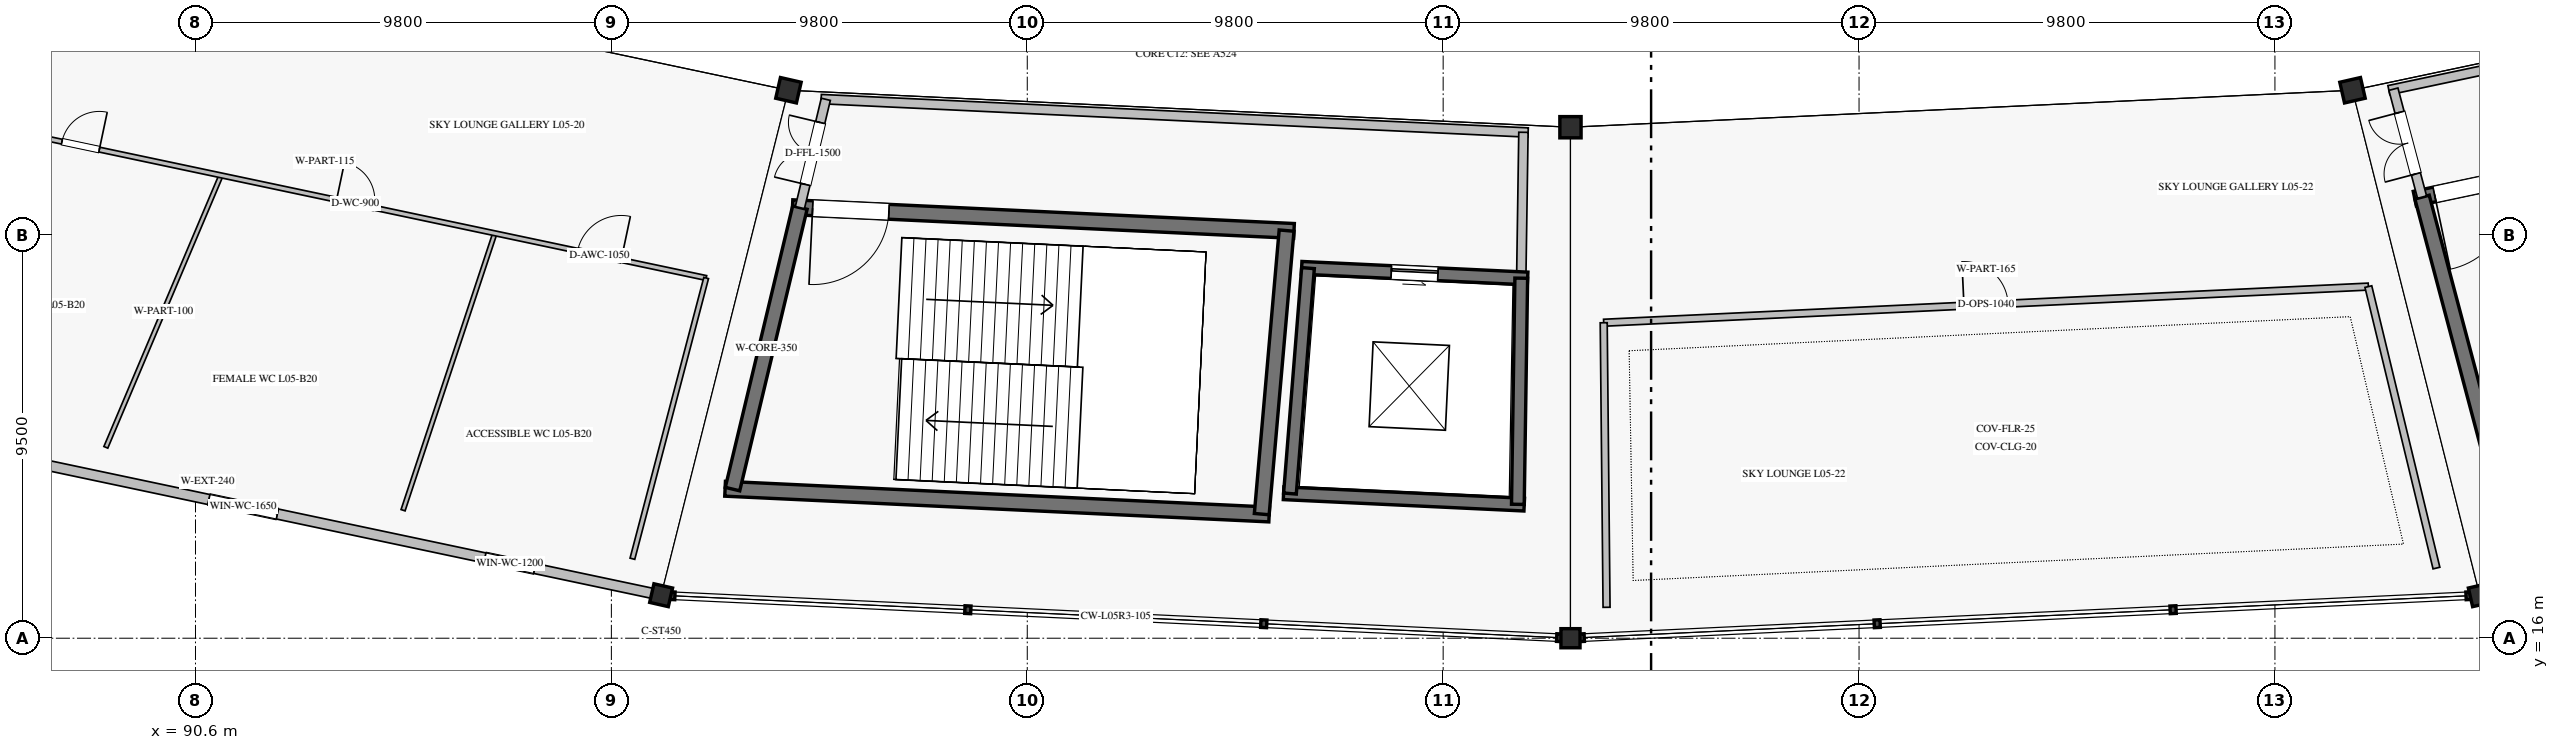
"""IFC4 building model, lengths in metres.
Left out: names, types, materials, properties, quantities, classifications, styles, units other than length and angle.
Written with IfcOpenShell. Run it as: python <this file> out.ifc"""

import sys

from ifc_helpers import new_model, si_unit, direction, frame, frame_2d, origin, origin_2d, place, context, subcontext, project, spatial, rectangle, hollow_rectangle, extrude, element, fill, save


model = new_model("IFC4")
c1 = context("Model", 3, precision=1e-05, world=origin(), true_north=direction((0.0, 1.0)))
c2 = subcontext(c1, "Body", "Model", "MODEL_VIEW")
j1 = project(units=[si_unit("LENGTHUNIT", "METRE"), si_unit("PLANEANGLEUNIT", "RADIAN")], contexts=[c1])
p1 = place(None, origin())
s1 = spatial("IfcSite", under=j1, at=p1, CompositionType="ELEMENT")
p2 = place(p1, origin())
s2 = spatial("IfcBuilding", under=s1, at=p2, CompositionType="ELEMENT")
p3 = place(p2, frame((0.0, 0.0, 25.84)))
s3 = spatial("IfcBuildingStorey", under=s2, at=p3, CompositionType="ELEMENT", Elevation=25.84)
for number, where, z_axis, x_axis in (
    (1, (104.572, 28.911, 0.0), (0.0, 0.0, 1.0), (-0.223, -0.975, 0.0)),
    (2, (123.0, 28.04, 0.0), (0.0, 0.0, 1.0), (0.0, -1.0, 0.0)),
    (3, (141.428, 28.911, 0.0), (0.0, 0.0, 1.0), (0.223, -0.975, 0.0)),
):
    element("IfcColumn", number, at=place(p3, frame(where, z_axis=z_axis, x_axis=x_axis)), inside=s3, PredefinedType="COLUMN", context=c2, shape_type="SweptSolid", body=[
        extrude(hollow_rectangle(XDim=0.5, YDim=0.5, WallThickness=0.022, at=origin_2d()), origin(), (0.0, 0.0, 1.0), 5.44),
    ])
for number, where, z_axis, x_axis in (
    (4, (101.572, 17.013, 0.0), (0.0, 0.0, 1.0), (-0.223, -0.975, 0.0)),
    (5, (123.0, 16.0, 0.0), (0.0, 0.0, 1.0), (0.0, -1.0, 0.0)),
    (6, (144.428, 17.013, 0.0), (0.0, 0.0, 1.0), (0.223, -0.975, 0.0)),
):
    element("IfcColumn", number, at=place(p3, frame(where, z_axis=z_axis, x_axis=x_axis)), inside=s3, PredefinedType="COLUMN", context=c2, shape_type="SweptSolid", body=[
        extrude(hollow_rectangle(XDim=0.45, YDim=0.45, WallThickness=0.022, at=origin_2d()), origin(), (0.0, 0.0, 1.0), 5.44),
    ])
p4 = place(p3, frame((80.41, 21.49, 0.0), z_axis=(0.0, 0.0, 1.0), x_axis=(0.978344108288, -0.206985037572, 0.0)))
e7 = element("IfcWall", 7, at=p4, inside=s3, PredefinedType="SOLIDWALL", context=c2, shape_type="SweptSolid", body=[
    extrude(rectangle(XDim=21.41, YDim=0.24, at=frame_2d((10.705, 0.0))), origin(), (0.0, 0.0, 1.0), 4.53),
])
p5 = place(p4, frame((3.557, 0.0, 1.65)))
e8 = element("IfcOpeningElement", 8, at=p5, cuts=e7, PredefinedType="OPENING", context=c2, shape_type="SweptSolid", body=[
    extrude(rectangle(XDim=1.45, YDim=0.95, at=frame_2d((0.725, 0.475))), frame((0.0, 0.13, 0.0), z_axis=(0.0, -1.0, 0.0), x_axis=(1.0, 0.0, 0.0)), (0.0, 0.0, 1.0), 0.26),
])
p6 = place(p4, frame((10.737, 0.0, 1.65)))
e9 = element("IfcOpeningElement", 9, at=p6, cuts=e7, PredefinedType="OPENING", context=c2, shape_type="SweptSolid", body=[
    extrude(rectangle(XDim=1.65, YDim=1.0, at=frame_2d((0.825, 0.5))), frame((0.0, 0.13, 0.0), z_axis=(0.0, -1.0, 0.0), x_axis=(1.0, 0.0, 0.0)), (0.0, 0.0, 1.0), 0.26),
])
p7 = place(p4, frame((17.385, 0.0, 1.65)))
e10 = element("IfcOpeningElement", 10, at=p7, cuts=e7, PredefinedType="OPENING", context=c2, shape_type="SweptSolid", body=[
    extrude(rectangle(XDim=1.2, YDim=0.9, at=frame_2d((0.6, 0.45))), frame((0.0, 0.13, 0.0), z_axis=(0.0, -1.0, 0.0), x_axis=(1.0, 0.0, 0.0)), (0.0, 0.0, 1.0), 0.26),
])
p8 = place(p3, frame((104.667, 26.155, 0.0), z_axis=(0.0, 0.0, 1.0), x_axis=(0.998883770468, -0.04723571843, 0.0)))
e11 = element("IfcWall", 11, at=p8, inside=s3, PredefinedType="SHEAR", context=c2, shape_type="SweptSolid", body=[
    extrude(rectangle(XDim=11.831, YDim=0.35, at=frame_2d((5.916, 0.0))), origin(), (0.0, 0.0, 1.0), 5.18),
])
p9 = place(p8, frame((0.475, 0.0, 0.0)))
e12 = element("IfcOpeningElement", 12, at=p9, cuts=e11, PredefinedType="OPENING", context=c2, shape_type="SweptSolid", body=[
    extrude(rectangle(XDim=1.8, YDim=2.2, at=frame_2d((0.9, 1.1))), frame((0.0, 0.185, 0.0), z_axis=(0.0, -1.0, 0.0), x_axis=(1.0, 0.0, 0.0)), (0.0, 0.0, 1.0), 0.37),
])
p10 = place(p3, frame((103.08, 19.522, 0.0), z_axis=(0.0, 0.0, 1.0), x_axis=(0.998884004857, -0.047230761603, 0.0)))
e13 = element("IfcWall", 13, at=p10, inside=s3, PredefinedType="SHEAR", context=c2, shape_type="SweptSolid", body=[
    extrude(rectangle(XDim=12.835, YDim=0.35, at=frame_2d((6.417, 0.0))), origin(), (0.0, 0.0, 1.0), 5.18),
])
p11 = place(p3, frame((104.842, 26.146, 0.0), z_axis=(0.0, 0.0, 1.0), x_axis=(-0.232820532896, -0.972519716747, 0.0)))
e14 = element("IfcWall", 14, at=p11, inside=s3, PredefinedType="SHEAR", context=c2, shape_type="SweptSolid", body=[
    extrude(rectangle(XDim=6.82, YDim=0.35, at=frame_2d((3.41, 0.0))), origin(), (0.0, 0.0, 1.0), 5.18),
])
p12 = place(p3, frame((116.31, 25.604, 0.0), z_axis=(0.0, 0.0, 1.0), x_axis=(-0.087232889326, -0.996187945631, 0.0)))
e15 = element("IfcWall", 15, at=p12, inside=s3, PredefinedType="SHEAR", context=c2, shape_type="SweptSolid", body=[
    extrude(rectangle(XDim=6.706, YDim=0.35, at=frame_2d((3.353, 0.0))), origin(), (0.0, 0.0, 1.0), 5.18),
])
p13 = place(p3, frame((116.665, 24.728, 0.0), z_axis=(0.0, 0.0, 1.0), x_axis=(0.998882494219, -0.047262699282, 0.0)))
e16 = element("IfcWall", 16, at=p13, inside=s3, PredefinedType="SHEAR", context=c2, shape_type="SweptSolid", body=[
    extrude(rectangle(XDim=5.331, YDim=0.3, at=frame_2d((2.666, 0.0))), origin(), (0.0, 0.0, 1.0), 5.18),
])
p14 = place(p13, frame((2.115, 0.0, 0.0)))
e17 = element("IfcOpeningElement", 17, at=p14, cuts=e16, PredefinedType="OPENING", context=c2, shape_type="SweptSolid", body=[
    extrude(rectangle(XDim=1.1, YDim=2.2, at=frame_2d((0.55, 1.1))), frame((0.0, 0.16, 0.0), z_axis=(0.0, -1.0, 0.0), x_axis=(1.0, 0.0, 0.0)), (0.0, 0.0, 1.0), 0.32),
])
p15 = place(p3, frame((116.24, 19.416, 0.0), z_axis=(0.0, 0.0, 1.0), x_axis=(0.998884329444, -0.047223896393, 0.0)))
e18 = element("IfcWall", 18, at=p15, inside=s3, PredefinedType="SHEAR", context=c2, shape_type="SweptSolid", body=[
    extrude(rectangle(XDim=5.677, YDim=0.3, at=frame_2d((2.838, 0.0))), origin(), (0.0, 0.0, 1.0), 5.18),
])
p16 = place(p3, frame((116.815, 24.72, 0.0), z_axis=(0.0, 0.0, 1.0), x_axis=(-0.079807132276, -0.996810323802, 0.0)))
e19 = element("IfcWall", 19, at=p16, inside=s3, PredefinedType="SHEAR", context=c2, shape_type="SweptSolid", body=[
    extrude(rectangle(XDim=5.329, YDim=0.3, at=frame_2d((2.665, 0.0))), origin(), (0.0, 0.0, 1.0), 5.18),
])
p17 = place(p3, frame((121.84, 24.483, 0.0), z_axis=(0.0, 0.0, 1.0), x_axis=(-0.014935332807, -0.999888461697, 0.0)))
e20 = element("IfcWall", 20, at=p17, inside=s3, PredefinedType="SHEAR", context=c2, shape_type="SweptSolid", body=[
    extrude(rectangle(XDim=5.329, YDim=0.3, at=frame_2d((2.665, 0.0))), origin(), (0.0, 0.0, 1.0), 5.18),
])
p18 = place(p3, frame((105.343, 28.703, 0.0), z_axis=(0.0, 0.0, 1.0), x_axis=(0.998884242682, -0.047225731555, 0.0)))
e21 = element("IfcWall", 21, at=p18, inside=s3, PredefinedType="SOLIDWALL", context=c2, shape_type="SweptSolid", body=[
    extrude(rectangle(XDim=16.677, YDim=0.22, at=frame_2d((8.339, 0.0))), origin(), (0.0, 0.0, 1.0), 5.18),
])
p19 = place(p3, frame((105.453, 28.698, 0.0), z_axis=(0.0, 0.0, 1.0), x_axis=(-0.232756927197, -0.972534941707, 0.0)))
e22 = element("IfcWall", 22, at=p19, inside=s3, PredefinedType="SOLIDWALL", context=c2, shape_type="SweptSolid", body=[
    extrude(rectangle(XDim=2.623, YDim=0.22, at=frame_2d((1.312, 0.0))), origin(), (0.0, 0.0, 1.0), 5.18),
])
p20 = place(p19, frame((0.562, 0.0, 0.0)))
e23 = element("IfcOpeningElement", 23, at=p20, cuts=e22, PredefinedType="OPENING", context=c2, shape_type="SweptSolid", body=[
    extrude(rectangle(XDim=1.5, YDim=2.2, at=frame_2d((0.75, 1.1))), frame((0.0, 0.12, 0.0), z_axis=(0.0, -1.0, 0.0), x_axis=(1.0, 0.0, 0.0)), (0.0, 0.0, 1.0), 0.24),
])
p21 = place(p3, frame((121.892, 27.92, 0.0), z_axis=(0.0, 0.0, 1.0), x_axis=(-0.014984113027, -0.999887731876, 0.0)))
e24 = element("IfcWall", 24, at=p21, inside=s3, PredefinedType="SOLIDWALL", context=c2, shape_type="SweptSolid", body=[
    extrude(rectangle(XDim=3.438, YDim=0.22, at=frame_2d((1.719, 0.0))), origin(), (0.0, 0.0, 1.0), 5.18),
])
p22 = place(p3, frame((142.896, 26.357, 0.0), z_axis=(0.0, 0.0, 1.0), x_axis=(0.978345203961, 0.206979858648, 0.0)))
e25 = element("IfcWall", 25, at=p22, inside=s3, PredefinedType="SHEAR", context=c2, shape_type="SweptSolid", body=[
    extrude(rectangle(XDim=12.044, YDim=0.35, at=frame_2d((6.022, 0.0))), origin(), (0.0, 0.0, 1.0), 5.18),
])
p23 = place(p22, frame((0.475, 0.0, 0.0)))
e26 = element("IfcOpeningElement", 26, at=p23, cuts=e25, PredefinedType="OPENING", context=c2, shape_type="SweptSolid", body=[
    extrude(rectangle(XDim=1.8, YDim=2.2, at=frame_2d((0.9, 1.1))), frame((0.0, 0.185, 0.0), z_axis=(0.0, -1.0, 0.0), x_axis=(1.0, 0.0, 0.0)), (0.0, 0.0, 1.0), 0.37),
])
p24 = place(p3, frame((143.067, 26.394, 0.0), z_axis=(0.0, 0.0, 1.0), x_axis=(0.256518400663, -0.966539347425, 0.0)))
e27 = element("IfcWall", 27, at=p24, inside=s3, PredefinedType="SHEAR", context=c2, shape_type="SweptSolid", body=[
    extrude(rectangle(XDim=6.84, YDim=0.35, at=frame_2d((3.42, 0.0))), origin(), (0.0, 0.0, 1.0), 5.18),
])
p25 = place(p3, frame((142.284, 28.914, 0.0), z_axis=(0.0, 0.0, 1.0), x_axis=(0.97834522483, 0.206979760008, 0.0)))
e28 = element("IfcWall", 28, at=p25, inside=s3, PredefinedType="SOLIDWALL", context=c2, shape_type="SweptSolid", body=[
    extrude(rectangle(XDim=16.983, YDim=0.22, at=frame_2d((8.491, 0.0))), origin(), (0.0, 0.0, 1.0), 5.18),
])
p26 = place(p3, frame((142.392, 28.936, 0.0), z_axis=(0.0, 0.0, 1.0), x_axis=(0.256507243456, -0.966542308466, 0.0)))
e29 = element("IfcWall", 29, at=p26, inside=s3, PredefinedType="SOLIDWALL", context=c2, shape_type="SweptSolid", body=[
    extrude(rectangle(XDim=2.631, YDim=0.22, at=frame_2d((1.315, 0.0))), origin(), (0.0, 0.0, 1.0), 5.18),
])
p27 = place(p26, frame((0.565, 0.0, 0.0)))
e30 = element("IfcOpeningElement", 30, at=p27, cuts=e29, PredefinedType="OPENING", context=c2, shape_type="SweptSolid", body=[
    extrude(rectangle(XDim=1.5, YDim=2.2, at=frame_2d((0.75, 1.1))), frame((0.0, 0.12, 0.0), z_axis=(0.0, -1.0, 0.0), x_axis=(1.0, 0.0, 0.0)), (0.0, 0.0, 1.0), 0.24),
])
p28 = place(p3, frame((84.658, 28.29, 0.0), z_axis=(0.0, 0.0, 1.0), x_axis=(0.978344735835, -0.20698207136, 0.0)))
e31 = element("IfcWall", 31, at=p28, inside=s3, PredefinedType="PARTITIONING", context=c2, shape_type="SweptSolid", body=[
    extrude(rectangle(XDim=18.374, YDim=0.115, at=frame_2d((9.187, 0.0))), origin(), (0.0, 0.0, 1.0), 4.5),
])
p29 = place(p28, frame((2.857, 0.0, 0.0)))
e32 = element("IfcOpeningElement", 32, at=p29, cuts=e31, PredefinedType="OPENING", context=c2, shape_type="SweptSolid", body=[
    extrude(rectangle(XDim=0.9, YDim=2.1, at=frame_2d((0.45, 1.05))), frame((0.0, 0.067, 0.0), z_axis=(0.0, -1.0, 0.0), x_axis=(1.0, 0.0, 0.0)), (0.0, 0.0, 1.0), 0.135),
])
p30 = place(p28, frame((9.472, 0.0, 0.0)))
e33 = element("IfcOpeningElement", 33, at=p30, cuts=e31, PredefinedType="OPENING", context=c2, shape_type="SweptSolid", body=[
    extrude(rectangle(XDim=0.9, YDim=2.1, at=frame_2d((0.45, 1.05))), frame((0.0, 0.067, 0.0), z_axis=(0.0, -1.0, 0.0), x_axis=(1.0, 0.0, 0.0)), (0.0, 0.0, 1.0), 0.135),
])
p31 = place(p28, frame((15.276, 0.0, 0.0)))
e34 = element("IfcOpeningElement", 34, at=p31, cuts=e31, PredefinedType="OPENING", context=c2, shape_type="SweptSolid", body=[
    extrude(rectangle(XDim=1.05, YDim=2.1, at=frame_2d((0.525, 1.05))), frame((0.0, 0.067, 0.0), z_axis=(0.0, -1.0, 0.0), x_axis=(1.0, 0.0, 0.0)), (0.0, 0.0, 1.0), 0.135),
])
p32 = place(p3, frame((102.634, 24.487, 0.0), z_axis=(0.0, 0.0, 1.0), x_axis=(-0.254126047026, -0.967171108038, 0.0)))
e35 = element("IfcWall", 35, at=p32, inside=s3, PredefinedType="PARTITIONING", context=c2, shape_type="SweptSolid", body=[
    extrude(rectangle(XDim=6.839, YDim=0.115, at=frame_2d((3.42, 0.0))), origin(), (0.0, 0.0, 1.0), 4.5),
])
p33 = place(p3, frame((91.201, 26.906, 0.0), z_axis=(0.0, 0.0, 1.0), x_axis=(-0.389927223737, -0.920845676641, 0.0)))
e36 = element("IfcWall", 36, at=p33, inside=s3, PredefinedType="PARTITIONING", context=c2, shape_type="SweptSolid", body=[
    extrude(rectangle(XDim=6.959, YDim=0.1, at=frame_2d((3.479, 0.0))), origin(), (0.0, 0.0, 1.0), 4.5),
])
p34 = place(p3, frame((97.654, 25.541, 0.0), z_axis=(0.0, 0.0, 1.0), x_axis=(-0.314639740382, -0.949211163953, 0.0)))
e37 = element("IfcWall", 37, at=p34, inside=s3, PredefinedType="PARTITIONING", context=c2, shape_type="SweptSolid", body=[
    extrude(rectangle(XDim=6.874, YDim=0.1, at=frame_2d((3.437, 0.0))), origin(), (0.0, 0.0, 1.0), 4.5),
])
p35 = place(p3, frame((123.783, 23.433, 0.0), z_axis=(0.0, 0.0, 1.0), x_axis=(0.998884400119, 0.047222401453, 0.0)))
e38 = element("IfcWall", 38, at=p35, inside=s3, PredefinedType="PARTITIONING", context=c2, shape_type="SweptSolid", body=[
    extrude(rectangle(XDim=18.038, YDim=0.165, at=frame_2d((9.019, 0.0))), origin(), (0.0, 0.0, 1.0), 4.5),
])
p36 = place(p35, frame((8.499, 0.0, 0.0)))
e39 = element("IfcOpeningElement", 39, at=p36, cuts=e38, PredefinedType="OPENING", context=c2, shape_type="SweptSolid", body=[
    extrude(rectangle(XDim=1.04, YDim=2.15, at=frame_2d((0.52, 1.075))), frame((0.0, 0.093, 0.0), z_axis=(0.0, -1.0, 0.0), x_axis=(1.0, 0.0, 0.0)), (0.0, 0.0, 1.0), 0.185),
])
p37 = place(p3, frame((123.783, 23.433, 0.0), z_axis=(0.0, 0.0, 1.0), x_axis=(0.009976563515, -0.999950232852, 0.0)))
e40 = element("IfcWall", 40, at=p37, inside=s3, PredefinedType="PARTITIONING", context=c2, shape_type="SweptSolid", body=[
    extrude(rectangle(XDim=6.705, YDim=0.165, at=frame_2d((3.353, 0.0))), origin(), (0.0, 0.0, 1.0), 4.5),
])
p38 = place(p3, frame((141.802, 24.285, 0.0), z_axis=(0.0, 0.0, 1.0), x_axis=(0.235145319277, -0.971960224918, 0.0)))
e41 = element("IfcWall", 41, at=p38, inside=s3, PredefinedType="PARTITIONING", context=c2, shape_type="SweptSolid", body=[
    extrude(rectangle(XDim=6.823, YDim=0.165, at=frame_2d((3.412, 0.0))), origin(), (0.0, 0.0, 1.0), 4.5),
])
p39 = place(p6, origin())
e42 = element("IfcWindow", 42, at=p39, inside=s3, PartitioningType="SINGLE_PANEL", PredefinedType="WINDOW", context=c2, shape_type="SweptSolid", body=[
    extrude(rectangle(XDim=1.65, YDim=1.0, at=frame_2d((0.825, 0.5))), frame((0.0, 0.03, 0.0), z_axis=(0.0, -1.0, 0.0), x_axis=(1.0, 0.0, 0.0)), (0.0, 0.0, 1.0), 0.06),
])
fill(e9, e42)
p40 = place(p7, origin())
e43 = element("IfcWindow", 43, at=p40, inside=s3, PartitioningType="SINGLE_PANEL", PredefinedType="WINDOW", context=c2, shape_type="SweptSolid", body=[
    extrude(rectangle(XDim=1.2, YDim=0.9, at=frame_2d((0.6, 0.45))), frame((0.0, 0.03, 0.0), z_axis=(0.0, -1.0, 0.0), x_axis=(1.0, 0.0, 0.0)), (0.0, 0.0, 1.0), 0.06),
])
fill(e10, e43)
p41 = place(p9, frame((1.8, 0.0, 0.0), z_axis=(0.0, 0.0, 1.0), x_axis=(-1.0, 0.0, 0.0)))
e44 = element("IfcDoor", 44, at=p41, inside=s3, OperationType="SINGLE_SWING_RIGHT", PredefinedType="DOOR", context=c2, shape_type="SweptSolid", body=[
    extrude(rectangle(XDim=1.8, YDim=2.2, at=frame_2d((0.9, 1.1))), frame((0.0, 0.025, 0.0), z_axis=(0.0, -1.0, 0.0), x_axis=(1.0, 0.0, 0.0)), (0.0, 0.0, 1.0), 0.05),
])
fill(e12, e44)
p42 = place(p14, origin())
e45 = element("IfcDoor", 45, at=p42, inside=s3, OperationType="SLIDING_TO_RIGHT", PredefinedType="DOOR", context=c2, shape_type="SweptSolid", body=[
    extrude(rectangle(XDim=1.1, YDim=2.2, at=frame_2d((0.55, 1.1))), frame((0.0, 0.025, 0.0), z_axis=(0.0, -1.0, 0.0), x_axis=(1.0, 0.0, 0.0)), (0.0, 0.0, 1.0), 0.05),
])
fill(e17, e45)
p43 = place(p20, frame((1.5, 0.0, 0.0), z_axis=(0.0, 0.0, 1.0), x_axis=(-1.0, 0.0, 0.0)))
e46 = element("IfcDoor", 46, at=p43, inside=s3, OperationType="DOUBLE_DOOR_SINGLE_SWING", PredefinedType="DOOR", context=c2, shape_type="SweptSolid", body=[
    extrude(rectangle(XDim=1.5, YDim=2.2, at=frame_2d((0.75, 1.1))), frame((0.0, 0.025, 0.0), z_axis=(0.0, -1.0, 0.0), x_axis=(1.0, 0.0, 0.0)), (0.0, 0.0, 1.0), 0.05),
])
fill(e23, e46)
p44 = place(p23, frame((1.8, 0.0, 0.0), z_axis=(0.0, 0.0, 1.0), x_axis=(-1.0, 0.0, 0.0)))
e47 = element("IfcDoor", 47, at=p44, inside=s3, OperationType="SINGLE_SWING_RIGHT", PredefinedType="DOOR", context=c2, shape_type="SweptSolid", body=[
    extrude(rectangle(XDim=1.8, YDim=2.2, at=frame_2d((0.9, 1.1))), frame((0.0, 0.025, 0.0), z_axis=(0.0, -1.0, 0.0), x_axis=(1.0, 0.0, 0.0)), (0.0, 0.0, 1.0), 0.05),
])
fill(e26, e47)
p45 = place(p27, frame((1.5, 0.0, 0.0), z_axis=(0.0, 0.0, 1.0), x_axis=(-1.0, 0.0, 0.0)))
e48 = element("IfcDoor", 48, at=p45, inside=s3, OperationType="DOUBLE_DOOR_SINGLE_SWING", PredefinedType="DOOR", context=c2, shape_type="SweptSolid", body=[
    extrude(rectangle(XDim=1.5, YDim=2.2, at=frame_2d((0.75, 1.1))), frame((0.0, 0.025, 0.0), z_axis=(0.0, -1.0, 0.0), x_axis=(1.0, 0.0, 0.0)), (0.0, 0.0, 1.0), 0.05),
])
fill(e30, e48)
p46 = place(p29, origin())
e49 = element("IfcDoor", 49, at=p46, inside=s3, OperationType="SINGLE_SWING_RIGHT", PredefinedType="DOOR", context=c2, shape_type="SweptSolid", body=[
    extrude(rectangle(XDim=0.9, YDim=2.1, at=frame_2d((0.45, 1.05))), frame((0.0, 0.025, 0.0), z_axis=(0.0, -1.0, 0.0), x_axis=(1.0, 0.0, 0.0)), (0.0, 0.0, 1.0), 0.05),
])
fill(e32, e49)
p47 = place(p30, origin())
e50 = element("IfcDoor", 50, at=p47, inside=s3, OperationType="SINGLE_SWING_LEFT", PredefinedType="DOOR", context=c2, shape_type="SweptSolid", body=[
    extrude(rectangle(XDim=0.9, YDim=2.1, at=frame_2d((0.45, 1.05))), frame((0.0, 0.025, 0.0), z_axis=(0.0, -1.0, 0.0), x_axis=(1.0, 0.0, 0.0)), (0.0, 0.0, 1.0), 0.05),
])
fill(e33, e50)
p48 = place(p31, origin())
e51 = element("IfcDoor", 51, at=p48, inside=s3, OperationType="SINGLE_SWING_RIGHT", PredefinedType="DOOR", context=c2, shape_type="SweptSolid", body=[
    extrude(rectangle(XDim=1.05, YDim=2.1, at=frame_2d((0.525, 1.05))), frame((0.0, 0.025, 0.0), z_axis=(0.0, -1.0, 0.0), x_axis=(1.0, 0.0, 0.0)), (0.0, 0.0, 1.0), 0.05),
])
fill(e34, e51)
p49 = place(p36, origin())
e52 = element("IfcDoor", 52, at=p49, inside=s3, OperationType="SINGLE_SWING_LEFT", PredefinedType="DOOR", context=c2, shape_type="SweptSolid", body=[
    extrude(rectangle(XDim=1.04, YDim=2.15, at=frame_2d((0.52, 1.075))), frame((0.0, 0.025, 0.0), z_axis=(0.0, -1.0, 0.0), x_axis=(1.0, 0.0, 0.0)), (0.0, 0.0, 1.0), 0.05),
])
fill(e39, e52)
save(model, sys.argv[1])
